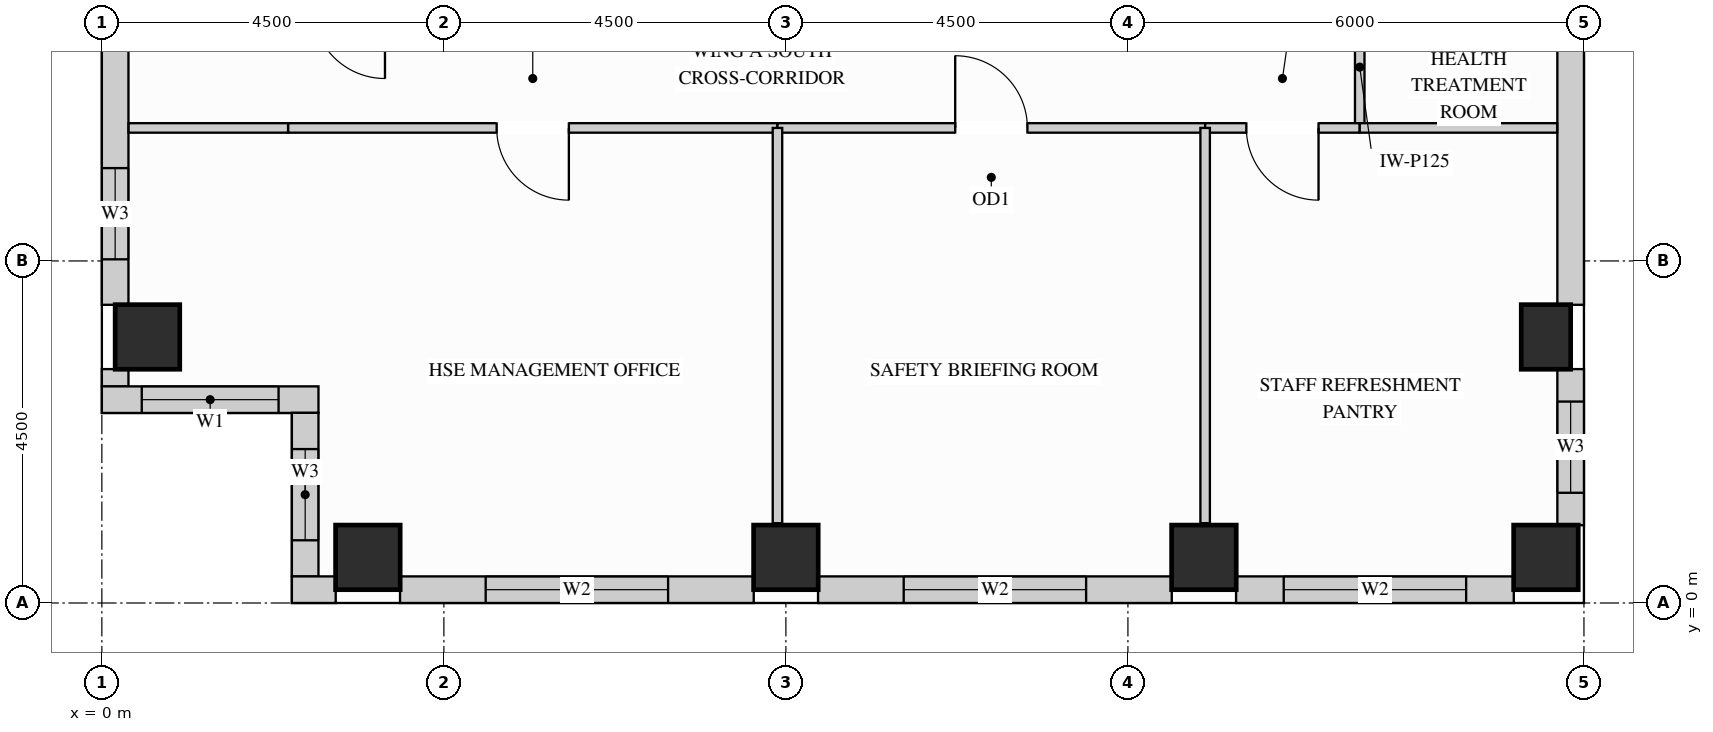
"""IFC4 building model, lengths in metres.
Left out: names, types, materials, properties, quantities, classifications, styles, units other than length and angle.
Written with IfcOpenShell. Run it as: python <this file> out.ifc"""

import sys

from ifc_helpers import new_model, si_unit, direction, frame, frame_2d, origin, origin_2d, place, context, subcontext, project, spatial, rectangle, extrude, source, transform, mapped, element, fill, save


model = new_model("IFC4")
c1 = context("Model", 3, precision=1e-05, world=origin(), true_north=direction((0.0, 1.0)))
c2 = subcontext(c1, "Body", "Model", "MODEL_VIEW")
j1 = project(units=[si_unit("LENGTHUNIT", "METRE"), si_unit("PLANEANGLEUNIT", "RADIAN")], contexts=[c1])
p1 = place(None, origin())
s1 = spatial("IfcSite", under=j1, at=p1, CompositionType="ELEMENT")
p2 = place(p1, origin())
s2 = spatial("IfcBuilding", under=s1, at=p2, CompositionType="ELEMENT")
p3 = place(p2, frame((0.0, 0.0, 226.8)))
s3 = spatial("IfcBuildingStorey", under=s2, at=p3, CompositionType="ELEMENT", Elevation=226.8)
m1 = source(origin(), c2, "Body", "SweptSolid", [
    extrude(rectangle(XDim=0.65, YDim=0.85, at=origin_2d()), origin(), (0.0, 0.0, 1.0), 3.4),
])
p4 = place(p3, frame((19.0, 3.5, 0.0), z_axis=(0.0, 0.0, 1.0), x_axis=(1.0, 0.0, 0.0)))
e1 = element("IfcColumn", 1, at=p4, inside=s3, PredefinedType="COLUMN", context=c2, shape_type="MappedRepresentation", body=[
    mapped(m1, transform((0.0, 0.0, 0.0), x_axis=(1.0, 0.0, 0.0), y_axis=(0.0, 1.0, 0.0), z_axis=(0.0, 0.0, 1.0))),
])
m2 = source(origin(), c2, "Body", "SweptSolid", [
    extrude(rectangle(XDim=0.85, YDim=0.85, at=origin_2d()), origin(), (0.0, 0.0, 1.0), 3.4),
])
for number, where, z_axis, x_axis in (
    (2, (14.5, 0.6, 0.0), (0.0, 0.0, 1.0), (1.0, 0.0, 0.0)),
    (3, (19.0, 0.6, 0.0), (0.0, 0.0, 1.0), (1.0, 0.0, 0.0)),
    (4, (3.5, 0.6, 0.0), (0.0, 0.0, 1.0), (1.0, 0.0, 0.0)),
    (5, (9.0, 0.6, 0.0), (0.0, 0.0, 1.0), (1.0, 0.0, 0.0)),
    (6, (0.6, 3.5, 0.0), (0.0, 0.0, 1.0), (1.0, 0.0, 0.0)),
):
    element("IfcColumn", number, at=place(p3, frame(where, z_axis=z_axis, x_axis=x_axis)), inside=s3, PredefinedType="COLUMN", context=c2, shape_type="MappedRepresentation", body=[
        mapped(m2, transform((0.0, 0.0, 0.0), x_axis=(1.0, 0.0, 0.0), y_axis=(0.0, 1.0, 0.0), z_axis=(0.0, 0.0, 1.0))),
    ])
p5 = place(p3, frame((0.175, 8.077, 0.0), z_axis=(0.0, 0.0, 1.0), x_axis=(0.0, -1.0, 0.0)))
e7 = element("IfcWall", 7, at=p5, inside=s3, PredefinedType="SOLIDWALL", context=c2, shape_type="SweptSolid", body=[
    extrude(rectangle(XDim=4.154, YDim=0.35, at=frame_2d((2.077, 0.0))), origin(), (0.0, 0.0, 1.0), 3.385),
])
p6 = place(p5, frame((2.355, 0.0, 0.78)))
e8 = element("IfcOpeningElement", 8, at=p6, cuts=e7, PredefinedType="OPENING", context=c2, shape_type="SweptSolid", body=[
    extrude(rectangle(XDim=1.2, YDim=2.1, at=frame_2d((0.6, 1.05))), frame((0.0, 0.185, 0.0), z_axis=(0.0, -1.0, 0.0), x_axis=(1.0, 0.0, 0.0)), (0.0, 0.0, 1.0), 0.37),
])
m3 = source(origin(), c2, "Body", "SweptSolid", [
    extrude(rectangle(XDim=0.229, YDim=0.35, at=frame_2d((0.115, 0.0))), origin(), (0.0, 0.0, 1.0), 3.385),
])
p7 = place(p3, frame((0.175, 3.077, 0.0), z_axis=(0.0, 0.0, 1.0), x_axis=(0.0, -1.0, 0.0)))
e9 = element("IfcWall", 9, at=p7, inside=s3, PredefinedType="SOLIDWALL", context=c2, shape_type="MappedRepresentation", body=[
    mapped(m3, transform((0.0, 0.0, 0.0), x_axis=(1.0, 0.0, 0.0), y_axis=(0.0, 1.0, 0.0), z_axis=(0.0, 0.0, 1.0))),
])
p8 = place(p3, frame((0.0, 2.675, 0.0), z_axis=(0.0, 0.0, 1.0), x_axis=(1.0, 0.0, 0.0)))
e10 = element("IfcWall", 10, at=p8, inside=s3, PredefinedType="SOLIDWALL", context=c2, shape_type="SweptSolid", body=[
    extrude(rectangle(XDim=2.85, YDim=0.35, at=frame_2d((1.425, 0.0))), origin(), (0.0, 0.0, 1.0), 3.385),
])
p9 = place(p8, frame((0.525, 0.0, 0.78)))
e11 = element("IfcOpeningElement", 11, at=p9, cuts=e10, PredefinedType="OPENING", context=c2, shape_type="SweptSolid", body=[
    extrude(rectangle(XDim=1.8, YDim=2.1, at=frame_2d((0.9, 1.05))), frame((0.0, 0.185, 0.0), z_axis=(0.0, -1.0, 0.0), x_axis=(1.0, 0.0, 0.0)), (0.0, 0.0, 1.0), 0.37),
])
p10 = place(p3, frame((2.675, 2.502, 0.0), z_axis=(0.0, 0.0, 1.0), x_axis=(0.0, -1.0, 0.0)))
e12 = element("IfcWall", 12, at=p10, inside=s3, PredefinedType="SOLIDWALL", context=c2, shape_type="SweptSolid", body=[
    extrude(rectangle(XDim=2.154, YDim=0.35, at=frame_2d((1.077, 0.0))), origin(), (0.0, 0.0, 1.0), 3.385),
])
p11 = place(p10, frame((0.477, 0.0, 0.78)))
e13 = element("IfcOpeningElement", 13, at=p11, cuts=e12, PredefinedType="OPENING", context=c2, shape_type="SweptSolid", body=[
    extrude(rectangle(XDim=1.2, YDim=2.1, at=frame_2d((0.6, 1.05))), frame((0.0, 0.185, 0.0), z_axis=(0.0, -1.0, 0.0), x_axis=(1.0, 0.0, 0.0)), (0.0, 0.0, 1.0), 0.37),
])
m4 = source(origin(), c2, "Body", "SweptSolid", [
    extrude(rectangle(XDim=0.577, YDim=0.35, at=frame_2d((0.289, 0.0))), origin(), (0.0, 0.0, 1.0), 3.385),
])
p12 = place(p3, frame((2.5, 0.175, 0.0), z_axis=(0.0, 0.0, 1.0), x_axis=(1.0, 0.0, 0.0)))
e14 = element("IfcWall", 14, at=p12, inside=s3, PredefinedType="SOLIDWALL", context=c2, shape_type="MappedRepresentation", body=[
    mapped(m4, transform((0.0, 0.0, 0.0), x_axis=(1.0, 0.0, 0.0), y_axis=(0.0, 1.0, 0.0), z_axis=(0.0, 0.0, 1.0))),
])
p13 = place(p3, frame((3.923, 0.175, 0.0), z_axis=(0.0, 0.0, 1.0), x_axis=(1.0, 0.0, 0.0)))
e15 = element("IfcWall", 15, at=p13, inside=s3, PredefinedType="SOLIDWALL", context=c2, shape_type="SweptSolid", body=[
    extrude(rectangle(XDim=4.654, YDim=0.35, at=frame_2d((2.327, 0.0))), origin(), (0.0, 0.0, 1.0), 3.385),
])
p14 = place(p13, frame((1.127, 0.0, 0.78)))
e16 = element("IfcOpeningElement", 16, at=p14, cuts=e15, PredefinedType="OPENING", context=c2, shape_type="SweptSolid", body=[
    extrude(rectangle(XDim=2.4, YDim=2.1, at=frame_2d((1.2, 1.05))), frame((0.0, 0.185, 0.0), z_axis=(0.0, -1.0, 0.0), x_axis=(1.0, 0.0, 0.0)), (0.0, 0.0, 1.0), 0.37),
])
p15 = place(p3, frame((9.423, 0.175, 0.0), z_axis=(0.0, 0.0, 1.0), x_axis=(1.0, 0.0, 0.0)))
e17 = element("IfcWall", 17, at=p15, inside=s3, PredefinedType="SOLIDWALL", context=c2, shape_type="SweptSolid", body=[
    extrude(rectangle(XDim=4.654, YDim=0.35, at=frame_2d((2.327, 0.0))), origin(), (0.0, 0.0, 1.0), 3.385),
])
p16 = place(p15, frame((1.127, 0.0, 0.78)))
e18 = element("IfcOpeningElement", 18, at=p16, cuts=e17, PredefinedType="OPENING", context=c2, shape_type="SweptSolid", body=[
    extrude(rectangle(XDim=2.4, YDim=2.1, at=frame_2d((1.2, 1.05))), frame((0.0, 0.185, 0.0), z_axis=(0.0, -1.0, 0.0), x_axis=(1.0, 0.0, 0.0)), (0.0, 0.0, 1.0), 0.37),
])
p17 = place(p3, frame((14.923, 0.175, 0.0), z_axis=(0.0, 0.0, 1.0), x_axis=(1.0, 0.0, 0.0)))
e19 = element("IfcWall", 19, at=p17, inside=s3, PredefinedType="SOLIDWALL", context=c2, shape_type="SweptSolid", body=[
    extrude(rectangle(XDim=3.654, YDim=0.35, at=frame_2d((1.827, 0.0))), origin(), (0.0, 0.0, 1.0), 3.385),
])
p18 = place(p17, frame((0.627, 0.0, 0.78)))
e20 = element("IfcOpeningElement", 20, at=p18, cuts=e19, PredefinedType="OPENING", context=c2, shape_type="SweptSolid", body=[
    extrude(rectangle(XDim=2.4, YDim=2.1, at=frame_2d((1.2, 1.05))), frame((0.0, 0.185, 0.0), z_axis=(0.0, -1.0, 0.0), x_axis=(1.0, 0.0, 0.0)), (0.0, 0.0, 1.0), 0.37),
])
p19 = place(p3, frame((19.325, 1.023, 0.0), z_axis=(0.0, 0.0, 1.0), x_axis=(0.0, 1.0, 0.0)))
e21 = element("IfcWall", 21, at=p19, inside=s3, PredefinedType="SOLIDWALL", context=c2, shape_type="SweptSolid", body=[
    extrude(rectangle(XDim=2.054, YDim=0.35, at=frame_2d((1.027, 0.0))), origin(), (0.0, 0.0, 1.0), 2.619),
])
p20 = place(p19, frame((0.427, 0.0, 0.78)))
e22 = element("IfcOpeningElement", 22, at=p20, cuts=e21, PredefinedType="OPENING", context=c2, shape_type="SweptSolid", body=[
    extrude(rectangle(XDim=1.2, YDim=1.659, at=frame_2d((0.6, 0.83))), frame((0.0, 0.185, 0.0), z_axis=(0.0, -1.0, 0.0), x_axis=(1.0, 0.0, 0.0)), (0.0, 0.0, 1.0), 0.37),
])
m5 = source(origin(), c2, "Body", "SweptSolid", [
    extrude(rectangle(XDim=4.154, YDim=0.35, at=frame_2d((2.077, 0.0))), origin(), (0.0, 0.0, 1.0), 2.619),
])
p21 = place(p3, frame((19.325, 3.923, 0.0), z_axis=(0.0, 0.0, 1.0), x_axis=(0.0, 1.0, 0.0)))
e23 = element("IfcWall", 23, at=p21, inside=s3, PredefinedType="SOLIDWALL", context=c2, shape_type="MappedRepresentation", body=[
    mapped(m5, transform((0.0, 0.0, 0.0), x_axis=(1.0, 0.0, 0.0), y_axis=(0.0, 1.0, 0.0), z_axis=(0.0, 0.0, 1.0))),
])
p22 = place(p3, frame((16.55, 6.25, 0.0), z_axis=(0.0, 0.0, 1.0), x_axis=(0.0, 1.0, 0.0)))
e24 = element("IfcWall", 24, at=p22, inside=s3, PredefinedType="PARTITIONING", context=c2, shape_type="SweptSolid", body=[
    extrude(rectangle(XDim=4.35, YDim=0.125, at=frame_2d((2.175, 0.0))), origin(), (0.0, 0.0, 1.0), 3.385),
])
p23 = place(p22, frame((1.7, 0.0, 0.0)))
e25 = element("IfcOpeningElement", 25, at=p23, cuts=e24, PredefinedType="OPENING", context=c2, shape_type="SweptSolid", body=[
    extrude(rectangle(XDim=0.95, YDim=2.15, at=frame_2d((0.475, 1.075))), frame((0.0, 0.073, 0.0), z_axis=(0.0, -1.0, 0.0), x_axis=(1.0, 0.0, 0.0)), (0.0, 0.0, 1.0), 0.145),
])
p24 = place(p3, frame((2.45, 6.25, 0.0), z_axis=(0.0, 0.0, 1.0), x_axis=(1.0, 0.0, 0.0)))
e26 = element("IfcWall", 26, at=p24, inside=s3, PredefinedType="PARTITIONING", context=c2, shape_type="SweptSolid", body=[
    extrude(rectangle(XDim=6.439, YDim=0.125, at=frame_2d((3.219, 0.0))), origin(), (0.0, 0.0, 1.0), 2.848),
])
p25 = place(p24, frame((2.744, 0.0, 0.0)))
e27 = element("IfcOpeningElement", 27, at=p25, cuts=e26, PredefinedType="OPENING", context=c2, shape_type="SweptSolid", body=[
    extrude(rectangle(XDim=0.95, YDim=2.15, at=frame_2d((0.475, 1.075))), frame((0.0, 0.073, 0.0), z_axis=(0.0, -1.0, 0.0), x_axis=(1.0, 0.0, 0.0)), (0.0, 0.0, 1.0), 0.145),
])
p26 = place(p3, frame((8.889, 6.25, 0.0), z_axis=(0.0, 0.0, 1.0), x_axis=(1.0, 0.0, 0.0)))
e28 = element("IfcWall", 28, at=p26, inside=s3, PredefinedType="PARTITIONING", context=c2, shape_type="SweptSolid", body=[
    extrude(rectangle(XDim=5.627, YDim=0.125, at=frame_2d((2.813, 0.0))), origin(), (0.0, 0.0, 1.0), 2.848),
])
p27 = place(p26, frame((2.338, 0.0, 0.0)))
e29 = element("IfcOpeningElement", 29, at=p27, cuts=e28, PredefinedType="OPENING", context=c2, shape_type="SweptSolid", body=[
    extrude(rectangle(XDim=0.95, YDim=2.15, at=frame_2d((0.475, 1.075))), frame((0.0, 0.073, 0.0), z_axis=(0.0, -1.0, 0.0), x_axis=(1.0, 0.0, 0.0)), (0.0, 0.0, 1.0), 0.145),
])
p28 = place(p3, frame((14.516, 6.25, 0.0), z_axis=(0.0, 0.0, 1.0), x_axis=(1.0, 0.0, 0.0)))
e30 = element("IfcWall", 30, at=p28, inside=s3, PredefinedType="PARTITIONING", context=c2, shape_type="SweptSolid", body=[
    extrude(rectangle(XDim=2.034, YDim=0.125, at=frame_2d((1.017, 0.0))), origin(), (0.0, 0.0, 1.0), 2.848),
])
p29 = place(p28, frame((0.542, 0.0, 0.0)))
e31 = element("IfcOpeningElement", 31, at=p29, cuts=e30, PredefinedType="OPENING", context=c2, shape_type="SweptSolid", body=[
    extrude(rectangle(XDim=0.95, YDim=2.15, at=frame_2d((0.475, 1.075))), frame((0.0, 0.073, 0.0), z_axis=(0.0, -1.0, 0.0), x_axis=(1.0, 0.0, 0.0)), (0.0, 0.0, 1.0), 0.145),
])
m6 = source(origin(), c2, "Body", "SweptSolid", [
    extrude(rectangle(XDim=2.098, YDim=0.125, at=frame_2d((1.049, 0.0))), origin(), (0.0, 0.0, 1.0), 2.848),
])
p30 = place(p3, frame((0.352, 6.25, 0.0), z_axis=(0.0, 0.0, 1.0), x_axis=(1.0, 0.0, 0.0)))
e32 = element("IfcWall", 32, at=p30, inside=s3, PredefinedType="PARTITIONING", context=c2, shape_type="MappedRepresentation", body=[
    mapped(m6, transform((0.0, 0.0, 0.0), x_axis=(1.0, 0.0, 0.0), y_axis=(0.0, 1.0, 0.0), z_axis=(0.0, 0.0, 1.0))),
])
m7 = source(origin(), c2, "Body", "SweptSolid", [
    extrude(rectangle(XDim=2.598, YDim=0.125, at=frame_2d((1.299, 0.0))), origin(), (0.0, 0.0, 1.0), 2.848),
])
p31 = place(p3, frame((16.55, 6.25, 0.0), z_axis=(0.0, 0.0, 1.0), x_axis=(1.0, 0.0, 0.0)))
e33 = element("IfcWall", 33, at=p31, inside=s3, PredefinedType="PARTITIONING", context=c2, shape_type="MappedRepresentation", body=[
    mapped(m7, transform((0.0, 0.0, 0.0), x_axis=(1.0, 0.0, 0.0), y_axis=(0.0, 1.0, 0.0), z_axis=(0.0, 0.0, 1.0))),
])
m8 = source(origin(), c2, "Body", "SweptSolid", [
    extrude(rectangle(XDim=5.2, YDim=0.125, at=frame_2d((2.6, 0.0))), origin(), (0.0, 0.0, 1.0), 3.385),
])
for number, where, z_axis, x_axis in (
    (34, (8.889, 1.05, 0.0), (0.0, 0.0, 1.0), (0.0, 1.0, 0.0)),
    (35, (14.516, 1.05, 0.0), (0.0, 0.0, 1.0), (0.0, 1.0, 0.0)),
):
    element("IfcWall", number, at=place(p3, frame(where, z_axis=z_axis, x_axis=x_axis)), inside=s3, PredefinedType="PARTITIONING", context=c2, shape_type="MappedRepresentation", body=[
        mapped(m8, transform((0.0, 0.0, 0.0), x_axis=(1.0, 0.0, 0.0), y_axis=(0.0, 1.0, 0.0), z_axis=(0.0, 0.0, 1.0))),
    ])
m9 = source(origin(), c2, "Body", "SweptSolid", [
    extrude(rectangle(XDim=0.95, YDim=2.15, at=frame_2d((0.475, 1.075))), frame((0.0, 0.025, 0.0), z_axis=(0.0, -1.0, 0.0), x_axis=(1.0, 0.0, 0.0)), (0.0, 0.0, 1.0), 0.05),
])
p32 = place(p25, origin())
e36 = element("IfcDoor", 36, at=p32, inside=s3, OperationType="SINGLE_SWING_RIGHT", PredefinedType="DOOR", context=c2, shape_type="MappedRepresentation", body=[
    mapped(m9, transform((0.0, 0.0, 0.0), x_axis=(1.0, 0.0, 0.0), y_axis=(0.0, 1.0, 0.0), z_axis=(0.0, 0.0, 1.0))),
])
fill(e27, e36)
p33 = place(p27, origin())
e37 = element("IfcDoor", 37, at=p33, inside=s3, OperationType="SINGLE_SWING_LEFT", PredefinedType="DOOR", context=c2, shape_type="MappedRepresentation", body=[
    mapped(m9, transform((0.0, 0.0, 0.0), x_axis=(1.0, 0.0, 0.0), y_axis=(0.0, 1.0, 0.0), z_axis=(0.0, 0.0, 1.0))),
])
fill(e29, e37)
p34 = place(p29, origin())
e38 = element("IfcDoor", 38, at=p34, inside=s3, OperationType="SINGLE_SWING_RIGHT", PredefinedType="DOOR", context=c2, shape_type="MappedRepresentation", body=[
    mapped(m9, transform((0.0, 0.0, 0.0), x_axis=(1.0, 0.0, 0.0), y_axis=(0.0, 1.0, 0.0), z_axis=(0.0, 0.0, 1.0))),
])
fill(e31, e38)
m10 = source(origin(), c2, "Body", "SweptSolid", [
    extrude(rectangle(XDim=1.8, YDim=2.1, at=frame_2d((0.9, 1.05))), frame((0.0, 0.03, 0.0), z_axis=(0.0, -1.0, 0.0), x_axis=(1.0, 0.0, 0.0)), (0.0, 0.0, 1.0), 0.06),
])
p35 = place(p9, origin())
e39 = element("IfcWindow", 39, at=p35, inside=s3, PartitioningType="SINGLE_PANEL", PredefinedType="WINDOW", context=c2, shape_type="MappedRepresentation", body=[
    mapped(m10, transform((0.0, 0.0, 0.0), x_axis=(1.0, 0.0, 0.0), y_axis=(0.0, 1.0, 0.0), z_axis=(0.0, 0.0, 1.0))),
])
fill(e11, e39)
m11 = source(origin(), c2, "Body", "SweptSolid", [
    extrude(rectangle(XDim=2.4, YDim=2.1, at=frame_2d((1.2, 1.05))), frame((0.0, 0.03, 0.0), z_axis=(0.0, -1.0, 0.0), x_axis=(1.0, 0.0, 0.0)), (0.0, 0.0, 1.0), 0.06),
])
p36 = place(p14, origin())
e40 = element("IfcWindow", 40, at=p36, inside=s3, PartitioningType="SINGLE_PANEL", PredefinedType="WINDOW", context=c2, shape_type="MappedRepresentation", body=[
    mapped(m11, transform((0.0, 0.0, 0.0), x_axis=(1.0, 0.0, 0.0), y_axis=(0.0, 1.0, 0.0), z_axis=(0.0, 0.0, 1.0))),
])
fill(e16, e40)
p37 = place(p16, origin())
e41 = element("IfcWindow", 41, at=p37, inside=s3, PartitioningType="SINGLE_PANEL", PredefinedType="WINDOW", context=c2, shape_type="MappedRepresentation", body=[
    mapped(m11, transform((0.0, 0.0, 0.0), x_axis=(1.0, 0.0, 0.0), y_axis=(0.0, 1.0, 0.0), z_axis=(0.0, 0.0, 1.0))),
])
fill(e18, e41)
p38 = place(p18, origin())
e42 = element("IfcWindow", 42, at=p38, inside=s3, PartitioningType="SINGLE_PANEL", PredefinedType="WINDOW", context=c2, shape_type="MappedRepresentation", body=[
    mapped(m11, transform((0.0, 0.0, 0.0), x_axis=(1.0, 0.0, 0.0), y_axis=(0.0, 1.0, 0.0), z_axis=(0.0, 0.0, 1.0))),
])
fill(e20, e42)
m12 = source(origin(), c2, "Body", "SweptSolid", [
    extrude(rectangle(XDim=1.2, YDim=2.1, at=frame_2d((0.6, 1.05))), frame((0.0, 0.03, 0.0), z_axis=(0.0, -1.0, 0.0), x_axis=(1.0, 0.0, 0.0)), (0.0, 0.0, 1.0), 0.06),
])
p39 = place(p6, origin())
e43 = element("IfcWindow", 43, at=p39, inside=s3, PartitioningType="SINGLE_PANEL", PredefinedType="WINDOW", context=c2, shape_type="MappedRepresentation", body=[
    mapped(m12, transform((0.0, 0.0, 0.0), x_axis=(1.0, 0.0, 0.0), y_axis=(0.0, 1.0, 0.0), z_axis=(0.0, 0.0, 1.0))),
])
fill(e8, e43)
p40 = place(p11, origin())
e44 = element("IfcWindow", 44, at=p40, inside=s3, PartitioningType="SINGLE_PANEL", PredefinedType="WINDOW", context=c2, shape_type="MappedRepresentation", body=[
    mapped(m12, transform((0.0, 0.0, 0.0), x_axis=(1.0, 0.0, 0.0), y_axis=(0.0, 1.0, 0.0), z_axis=(0.0, 0.0, 1.0))),
])
fill(e13, e44)
m13 = source(origin(), c2, "Body", "SweptSolid", [
    extrude(rectangle(XDim=1.2, YDim=1.659, at=frame_2d((0.6, 0.83))), frame((0.0, 0.03, 0.0), z_axis=(0.0, -1.0, 0.0), x_axis=(1.0, 0.0, 0.0)), (0.0, 0.0, 1.0), 0.06),
])
p41 = place(p20, origin())
e45 = element("IfcWindow", 45, at=p41, inside=s3, PartitioningType="SINGLE_PANEL", PredefinedType="WINDOW", context=c2, shape_type="MappedRepresentation", body=[
    mapped(m13, transform((0.0, 0.0, 0.0), x_axis=(1.0, 0.0, 0.0), y_axis=(0.0, 1.0, 0.0), z_axis=(0.0, 0.0, 1.0))),
])
fill(e22, e45)
save(model, sys.argv[1])
